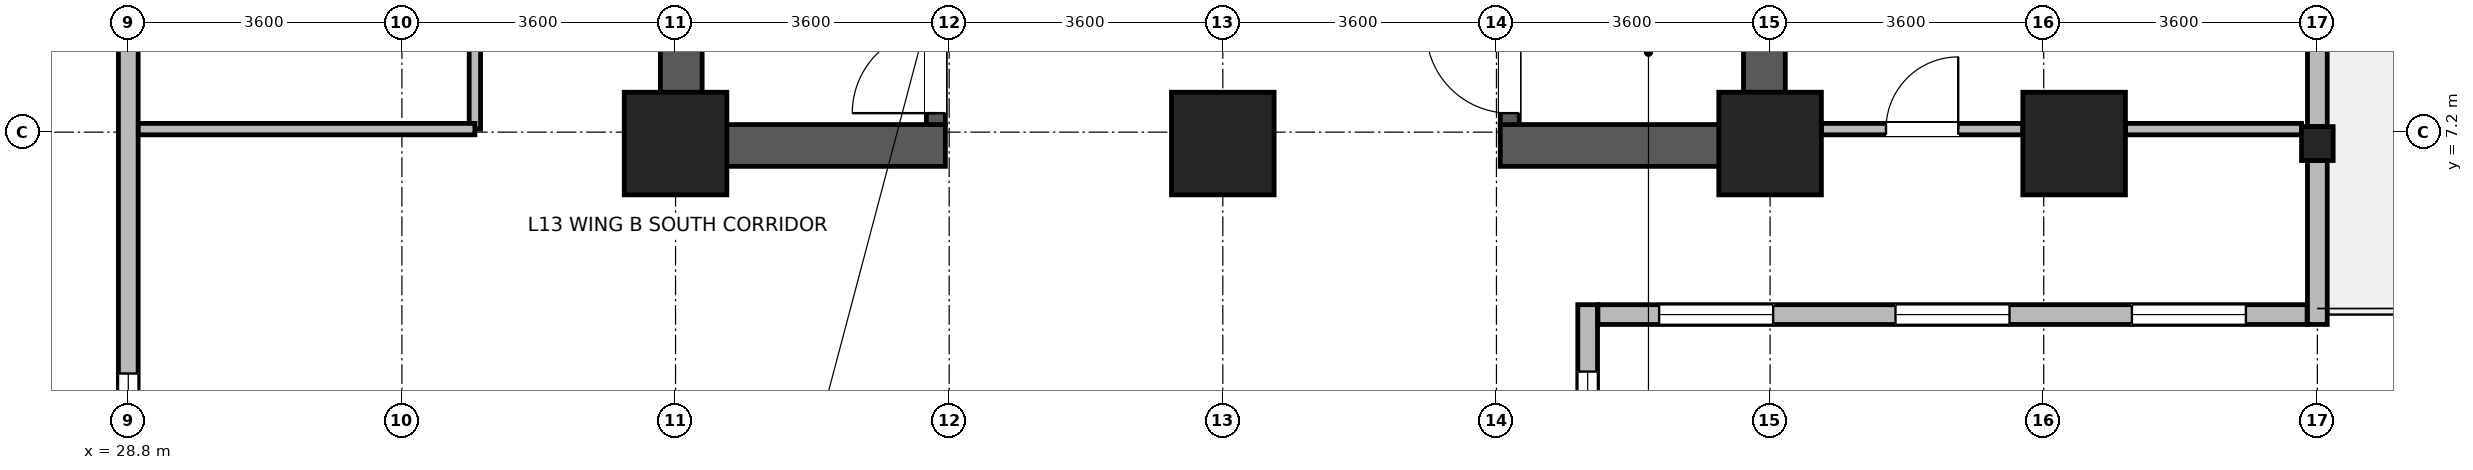
"""IFC4 building model, lengths in metres.
Left out: names, types, materials, properties, quantities, classifications, styles, units other than length and angle.
Written with IfcOpenShell. Run it as: python <this file> out.ifc"""

import sys

from ifc_helpers import new_model, si_unit, direction, frame, frame_2d, origin, origin_2d, place, context, subcontext, project, spatial, rectangle, i_section, extrude, source, transform, mapped, element, fill, save


model = new_model("IFC4")
c1 = context("Model", 3, precision=1e-05, world=origin(), true_north=direction((0.0, 1.0)))
c2 = subcontext(c1, "Body", "Model", "MODEL_VIEW")
j1 = project(units=[si_unit("LENGTHUNIT", "METRE"), si_unit("PLANEANGLEUNIT", "RADIAN")], contexts=[c1])
p1 = place(None, origin())
s1 = spatial("IfcSite", under=j1, at=p1, CompositionType="ELEMENT")
p2 = place(p1, origin())
s2 = spatial("IfcBuilding", under=s1, at=p2, CompositionType="ELEMENT")
p3 = place(p2, frame((0.0, 0.0, 54.9)))
s3 = spatial("IfcBuildingStorey", under=s2, at=p3, CompositionType="ELEMENT", Elevation=54.9)
for number, where, z_axis, x_axis in (
    (1, (36.075, 6.75, 0.0), (0.0, 0.0, 1.0), (0.0, 1.0, 0.0)),
    (2, (50.325, 6.75, 0.0), (0.0, 0.0, 1.0), (0.0, 1.0, 0.0)),
):
    element("IfcWall", number, at=place(p3, frame(where, z_axis=z_axis, x_axis=x_axis)), inside=s3, PredefinedType="SHEAR", context=c2, shape_type="SweptSolid", body=[
        extrude(rectangle(XDim=8.1, YDim=0.55, at=frame_2d((4.05, 0.0))), origin(), (0.0, 0.0, 1.0), 3.45),
    ])
for number, where, z_axis, x_axis in (
    (3, (36.35, 7.025, 0.0), (0.0, 0.0, 1.0), (1.0, 0.0, 0.0)),
    (4, (46.85, 7.025, 0.0), (0.0, 0.0, 1.0), (1.0, 0.0, 0.0)),
):
    element("IfcWall", number, at=place(p3, frame(where, z_axis=z_axis, x_axis=x_axis)), inside=s3, PredefinedType="SHEAR", context=c2, shape_type="SweptSolid", body=[
        extrude(rectangle(XDim=3.2, YDim=0.55, at=frame_2d((1.6, 0.0))), origin(), (0.0, 0.0, 1.0), 3.45),
    ])
p4 = place(p3, frame((39.425, 7.3, 0.0), z_axis=(0.0, 0.0, 1.0), x_axis=(0.0, 1.0, 0.0)))
e5 = element("IfcWall", 5, at=p4, inside=s3, PredefinedType="SHEAR", context=c2, shape_type="SweptSolid", body=[
    extrude(rectangle(XDim=7.0, YDim=0.25, at=frame_2d((3.5, 0.0))), origin(), (0.0, 0.0, 1.0), 3.45),
])
p5 = place(p4, frame((0.15, 0.0, 0.0)))
e6 = element("IfcOpeningElement", 6, at=p5, cuts=e5, PredefinedType="OPENING", context=c2, shape_type="SweptSolid", body=[
    extrude(rectangle(XDim=1.1, YDim=2.08, at=frame_2d((0.55, 1.04))), frame((0.0, 0.135, 0.0), z_axis=(0.0, -1.0, 0.0), x_axis=(1.0, 0.0, 0.0)), (0.0, 0.0, 1.0), 0.27),
])
p6 = place(p3, frame((46.975, 7.3, 0.0), z_axis=(0.0, 0.0, 1.0), x_axis=(0.0, 1.0, 0.0)))
e7 = element("IfcWall", 7, at=p6, inside=s3, PredefinedType="SHEAR", context=c2, shape_type="SweptSolid", body=[
    extrude(rectangle(XDim=7.0, YDim=0.25, at=frame_2d((3.5, 0.0))), origin(), (0.0, 0.0, 1.0), 3.45),
])
p7 = place(p6, frame((0.15, 0.0, 0.0)))
e8 = element("IfcOpeningElement", 8, at=p7, cuts=e7, PredefinedType="OPENING", context=c2, shape_type="SweptSolid", body=[
    extrude(rectangle(XDim=1.1, YDim=2.08, at=frame_2d((0.55, 1.04))), frame((0.0, 0.135, 0.0), z_axis=(0.0, -1.0, 0.0), x_axis=(1.0, 0.0, 0.0)), (0.0, 0.0, 1.0), 0.27),
])
m1 = source(origin(), c2, "Body", "SweptSolid", [
    extrude(rectangle(XDim=1.35, YDim=1.35, at=origin_2d()), origin(), (0.0, 0.0, 1.0), 3.7),
])
for number, where, z_axis, x_axis in (
    (9, (36.0, 7.05, 0.0), (0.0, 0.0, 1.0), (1.0, 0.0, 0.0)),
    (10, (43.2, 7.05, 0.0), (0.0, 0.0, 1.0), (1.0, 0.0, 0.0)),
    (11, (50.4, 7.05, 0.0), (0.0, 0.0, 1.0), (1.0, 0.0, 0.0)),
    (12, (54.4, 7.05, 0.0), (0.0, 0.0, 1.0), (1.0, 0.0, 0.0)),
):
    element("IfcColumn", number, at=place(p3, frame(where, z_axis=z_axis, x_axis=x_axis)), inside=s3, PredefinedType="COLUMN", context=c2, shape_type="MappedRepresentation", body=[
        mapped(m1, transform((0.0, 0.0, 0.0), x_axis=(1.0, 0.0, 0.0), y_axis=(0.0, 1.0, 0.0), z_axis=(0.0, 0.0, 1.0), scale=1.0)),
    ])
m2 = source(origin(), c2, "Body", "SweptSolid", [
    extrude(i_section(OverallWidth=0.416, OverallDepth=0.446, WebThickness=0.029, FlangeThickness=0.04, FilletRadius=0.015, at=origin_2d()), origin(), (0.0, 0.0, 1.0), 3.7),
])
p8 = place(p3, frame((57.6, 7.05, 0.0), z_axis=(0.0, 0.0, 1.0), x_axis=(1.0, 0.0, 0.0)))
e13 = element("IfcColumn", 13, at=p8, inside=s3, PredefinedType="COLUMN", context=c2, shape_type="MappedRepresentation", body=[
    mapped(m2, transform((0.0, 0.0, 0.0), x_axis=(1.0, 0.0, 0.0), y_axis=(0.0, 1.0, 0.0), z_axis=(0.0, 0.0, 1.0), scale=1.0)),
])
p9 = place(p3, frame((48.0, 4.93, 0.0), z_axis=(0.0, 0.0, 1.0), x_axis=(0.0, -1.0, 0.0)))
e14 = element("IfcWall", 14, at=p9, inside=s3, PredefinedType="STANDARD", context=c2, shape_type="SweptSolid", body=[
    extrude(rectangle(XDim=3.26, YDim=0.26, at=frame_2d((1.63, 0.0))), origin(), (0.0, 0.0, 1.0), 3.43),
])
p10 = place(p9, frame((0.88, 0.0, 0.85)))
e15 = element("IfcOpeningElement", 15, at=p10, cuts=e14, PredefinedType="OPENING", context=c2, shape_type="SweptSolid", body=[
    extrude(rectangle(XDim=1.5, YDim=1.85, at=frame_2d((0.75, 0.925))), frame((0.0, 0.14, 0.0), z_axis=(0.0, -1.0, 0.0), x_axis=(1.0, 0.0, 0.0)), (0.0, 0.0, 1.0), 0.28),
])
p11 = place(p3, frame((57.465, 4.8, 0.0), z_axis=(0.0, 0.0, 1.0), x_axis=(-1.0, 0.0, 0.0)))
e16 = element("IfcWall", 16, at=p11, inside=s3, PredefinedType="STANDARD", context=c2, shape_type="SweptSolid", body=[
    extrude(rectangle(XDim=9.33, YDim=0.26, at=frame_2d((4.665, 0.0))), origin(), (0.0, 0.0, 1.0), 3.43),
])
p12 = place(p11, frame((0.805, 0.0, 0.85)))
e17 = element("IfcOpeningElement", 17, at=p12, cuts=e16, PredefinedType="OPENING", context=c2, shape_type="SweptSolid", body=[
    extrude(rectangle(XDim=1.5, YDim=1.85, at=frame_2d((0.75, 0.925))), frame((0.0, 0.14, 0.0), z_axis=(0.0, -1.0, 0.0), x_axis=(1.0, 0.0, 0.0)), (0.0, 0.0, 1.0), 0.28),
])
p13 = place(p11, frame((3.915, 0.0, 0.85)))
e18 = element("IfcOpeningElement", 18, at=p13, cuts=e16, PredefinedType="OPENING", context=c2, shape_type="SweptSolid", body=[
    extrude(rectangle(XDim=1.5, YDim=1.85, at=frame_2d((0.75, 0.925))), frame((0.0, 0.14, 0.0), z_axis=(0.0, -1.0, 0.0), x_axis=(1.0, 0.0, 0.0)), (0.0, 0.0, 1.0), 0.28),
])
p14 = place(p11, frame((7.025, 0.0, 0.85)))
e19 = element("IfcOpeningElement", 19, at=p14, cuts=e16, PredefinedType="OPENING", context=c2, shape_type="SweptSolid", body=[
    extrude(rectangle(XDim=1.5, YDim=1.85, at=frame_2d((0.75, 0.925))), frame((0.0, 0.14, 0.0), z_axis=(0.0, -1.0, 0.0), x_axis=(1.0, 0.0, 0.0)), (0.0, 0.0, 1.0), 0.28),
])
p15 = place(p3, frame((57.6, 6.826, 0.0), z_axis=(0.0, 0.0, 1.0), x_axis=(0.0, -1.0, 0.0)))
e20 = element("IfcWall", 20, at=p15, inside=s3, PredefinedType="STANDARD", context=c2, shape_type="SweptSolid", body=[
    extrude(rectangle(XDim=2.156, YDim=0.26, at=frame_2d((1.078, 0.0))), origin(), (0.0, 0.0, 1.0), 3.43),
])
p16 = place(p3, frame((57.6, 14.326, 0.0), z_axis=(0.0, 0.0, 1.0), x_axis=(0.0, -1.0, 0.0)))
e21 = element("IfcWall", 21, at=p16, inside=s3, PredefinedType="STANDARD", context=c2, shape_type="SweptSolid", body=[
    extrude(rectangle(XDim=7.052, YDim=0.26, at=frame_2d((3.526, 0.0))), origin(), (0.0, 0.0, 1.0), 2.93),
])
p17 = place(p16, frame((2.776, 0.0, 0.0)))
e22 = element("IfcOpeningElement", 22, at=p17, cuts=e21, PredefinedType="OPENING", context=c2, shape_type="SweptSolid", body=[
    extrude(rectangle(XDim=1.5, YDim=2.15, at=frame_2d((0.75, 1.075))), frame((0.0, 0.14, 0.0), z_axis=(0.0, -1.0, 0.0), x_axis=(1.0, 0.0, 0.0)), (0.0, 0.0, 1.0), 0.28),
])
p18 = place(p16, frame((1.013, 0.0, 0.85)))
e23 = element("IfcOpeningElement", 23, at=p18, cuts=e21, PredefinedType="OPENING", context=c2, shape_type="SweptSolid", body=[
    extrude(rectangle(XDim=1.5, YDim=1.85, at=frame_2d((0.75, 0.925))), frame((0.0, 0.14, 0.0), z_axis=(0.0, -1.0, 0.0), x_axis=(1.0, 0.0, 0.0)), (0.0, 0.0, 1.0), 0.28),
])
p19 = place(p16, frame((4.539, 0.0, 0.85)))
e24 = element("IfcOpeningElement", 24, at=p19, cuts=e21, PredefinedType="OPENING", context=c2, shape_type="SweptSolid", body=[
    extrude(rectangle(XDim=1.5, YDim=1.85, at=frame_2d((0.75, 0.925))), frame((0.0, 0.14, 0.0), z_axis=(0.0, -1.0, 0.0), x_axis=(1.0, 0.0, 0.0)), (0.0, 0.0, 1.0), 0.28),
])
p20 = place(p3, frame((28.8, 1.67, 0.0), z_axis=(0.0, 0.0, 1.0), x_axis=(0.0, 1.0, 0.0)))
e25 = element("IfcWall", 25, at=p20, inside=s3, PredefinedType="STANDARD", context=c2, shape_type="SweptSolid", body=[
    extrude(rectangle(XDim=19.254, YDim=0.26, at=frame_2d((9.627, 0.0))), origin(), (0.0, 0.0, 1.0), 3.43),
])
p21 = place(p20, frame((0.854, 0.0, 0.85)))
e26 = element("IfcOpeningElement", 26, at=p21, cuts=e25, PredefinedType="OPENING", context=c2, shape_type="SweptSolid", body=[
    extrude(rectangle(XDim=1.5, YDim=1.85, at=frame_2d((0.75, 0.925))), frame((0.0, 0.14, 0.0), z_axis=(0.0, -1.0, 0.0), x_axis=(1.0, 0.0, 0.0)), (0.0, 0.0, 1.0), 0.28),
])
p22 = place(p20, frame((7.272, 0.0, 0.85)))
e27 = element("IfcOpeningElement", 27, at=p22, cuts=e25, PredefinedType="OPENING", context=c2, shape_type="SweptSolid", body=[
    extrude(rectangle(XDim=1.5, YDim=1.85, at=frame_2d((0.75, 0.925))), frame((0.0, 0.14, 0.0), z_axis=(0.0, -1.0, 0.0), x_axis=(1.0, 0.0, 0.0)), (0.0, 0.0, 1.0), 0.28),
])
p23 = place(p20, frame((10.481, 0.0, 0.85)))
e28 = element("IfcOpeningElement", 28, at=p23, cuts=e25, PredefinedType="OPENING", context=c2, shape_type="SweptSolid", body=[
    extrude(rectangle(XDim=1.5, YDim=1.85, at=frame_2d((0.75, 0.925))), frame((0.0, 0.14, 0.0), z_axis=(0.0, -1.0, 0.0), x_axis=(1.0, 0.0, 0.0)), (0.0, 0.0, 1.0), 0.28),
])
p24 = place(p20, frame((13.69, 0.0, 0.85)))
e29 = element("IfcOpeningElement", 29, at=p24, cuts=e25, PredefinedType="OPENING", context=c2, shape_type="SweptSolid", body=[
    extrude(rectangle(XDim=1.5, YDim=1.85, at=frame_2d((0.75, 0.925))), frame((0.0, 0.14, 0.0), z_axis=(0.0, -1.0, 0.0), x_axis=(1.0, 0.0, 0.0)), (0.0, 0.0, 1.0), 0.28),
])
p25 = place(p20, frame((16.899, 0.0, 0.85)))
e30 = element("IfcOpeningElement", 30, at=p25, cuts=e25, PredefinedType="OPENING", context=c2, shape_type="SweptSolid", body=[
    extrude(rectangle(XDim=1.5, YDim=1.85, at=frame_2d((0.75, 0.925))), frame((0.0, 0.14, 0.0), z_axis=(0.0, -1.0, 0.0), x_axis=(1.0, 0.0, 0.0)), (0.0, 0.0, 1.0), 0.28),
])
p26 = place(p3, frame((33.36, 7.24, 0.0), z_axis=(0.0, 0.0, 1.0), x_axis=(0.0, 1.0, 0.0)))
e31 = element("IfcWall", 31, at=p26, inside=s3, PredefinedType="PARTITIONING", context=c2, shape_type="SweptSolid", body=[
    extrude(rectangle(XDim=7.26, YDim=0.15, at=frame_2d((3.63, 0.0))), origin(), (0.0, 0.0, 1.0), 3.43),
])
p27 = place(p26, frame((2.98, 0.0, 0.0)))
e32 = element("IfcOpeningElement", 32, at=p27, cuts=e31, PredefinedType="OPENING", context=c2, shape_type="SweptSolid", body=[
    extrude(rectangle(XDim=1.3, YDim=2.12, at=frame_2d((0.65, 1.06))), frame((0.0, 0.085, 0.0), z_axis=(0.0, -1.0, 0.0), x_axis=(1.0, 0.0, 0.0)), (0.0, 0.0, 1.0), 0.17),
])
p28 = place(p3, frame((51.075, 7.24, 0.0), z_axis=(0.0, 0.0, 1.0), x_axis=(1.0, 0.0, 0.0)))
e33 = element("IfcWall", 33, at=p28, inside=s3, PredefinedType="PARTITIONING", context=c2, shape_type="SweptSolid", body=[
    extrude(rectangle(XDim=2.65, YDim=0.15, at=frame_2d((1.325, 0.0))), origin(), (0.0, 0.0, 1.0), 2.78),
])
p29 = place(p28, frame((0.85, 0.0, 0.0)))
e34 = element("IfcOpeningElement", 34, at=p29, cuts=e33, PredefinedType="OPENING", context=c2, shape_type="SweptSolid", body=[
    extrude(rectangle(XDim=0.95, YDim=2.1, at=frame_2d((0.475, 1.05))), frame((0.0, 0.085, 0.0), z_axis=(0.0, -1.0, 0.0), x_axis=(1.0, 0.0, 0.0)), (0.0, 0.0, 1.0), 0.17),
])
p30 = place(p3, frame((55.075, 7.24, 0.0), z_axis=(0.0, 0.0, 1.0), x_axis=(1.0, 0.0, 0.0)))
e35 = element("IfcWall", 35, at=p30, inside=s3, PredefinedType="PARTITIONING", context=c2, shape_type="SweptSolid", body=[
    extrude(rectangle(XDim=2.317, YDim=0.15, at=frame_2d((1.159, 0.0))), origin(), (0.0, 0.0, 1.0), 2.78),
])
p31 = place(p3, frame((28.932, 7.24, 0.0), z_axis=(0.0, 0.0, 1.0), x_axis=(1.0, 0.0, 0.0)))
e36 = element("IfcWall", 36, at=p31, inside=s3, PredefinedType="PARTITIONING", context=c2, shape_type="SweptSolid", body=[
    extrude(rectangle(XDim=4.428, YDim=0.15, at=frame_2d((2.214, 0.0))), origin(), (0.0, 0.0, 1.0), 3.43),
])
p32 = place(p10, origin())
e37 = element("IfcWindow", 37, at=p32, inside=s3, PartitioningType="SINGLE_PANEL", PredefinedType="WINDOW", context=c2, shape_type="SweptSolid", body=[
    extrude(rectangle(XDim=1.5, YDim=1.85, at=frame_2d((0.75, 0.925))), frame((0.0, 0.03, 0.0), z_axis=(0.0, -1.0, 0.0), x_axis=(1.0, 0.0, 0.0)), (0.0, 0.0, 1.0), 0.06),
])
fill(e15, e37)
p33 = place(p12, origin())
e38 = element("IfcWindow", 38, at=p33, inside=s3, PartitioningType="SINGLE_PANEL", PredefinedType="WINDOW", context=c2, shape_type="SweptSolid", body=[
    extrude(rectangle(XDim=1.5, YDim=1.85, at=frame_2d((0.75, 0.925))), frame((0.0, 0.03, 0.0), z_axis=(0.0, -1.0, 0.0), x_axis=(1.0, 0.0, 0.0)), (0.0, 0.0, 1.0), 0.06),
])
fill(e17, e38)
p34 = place(p13, origin())
e39 = element("IfcWindow", 39, at=p34, inside=s3, PartitioningType="SINGLE_PANEL", PredefinedType="WINDOW", context=c2, shape_type="SweptSolid", body=[
    extrude(rectangle(XDim=1.5, YDim=1.85, at=frame_2d((0.75, 0.925))), frame((0.0, 0.03, 0.0), z_axis=(0.0, -1.0, 0.0), x_axis=(1.0, 0.0, 0.0)), (0.0, 0.0, 1.0), 0.06),
])
fill(e18, e39)
p35 = place(p14, origin())
e40 = element("IfcWindow", 40, at=p35, inside=s3, PartitioningType="SINGLE_PANEL", PredefinedType="WINDOW", context=c2, shape_type="SweptSolid", body=[
    extrude(rectangle(XDim=1.5, YDim=1.85, at=frame_2d((0.75, 0.925))), frame((0.0, 0.03, 0.0), z_axis=(0.0, -1.0, 0.0), x_axis=(1.0, 0.0, 0.0)), (0.0, 0.0, 1.0), 0.06),
])
fill(e19, e40)
p36 = place(p21, origin())
e41 = element("IfcWindow", 41, at=p36, inside=s3, PartitioningType="SINGLE_PANEL", PredefinedType="WINDOW", context=c2, shape_type="SweptSolid", body=[
    extrude(rectangle(XDim=1.5, YDim=1.85, at=frame_2d((0.75, 0.925))), frame((0.0, 0.03, 0.0), z_axis=(0.0, -1.0, 0.0), x_axis=(1.0, 0.0, 0.0)), (0.0, 0.0, 1.0), 0.06),
])
fill(e26, e41)
p37 = place(p5, origin())
e42 = element("IfcDoor", 42, at=p37, inside=s3, OperationType="SINGLE_SWING_LEFT", PredefinedType="DOOR", context=c2, shape_type="SweptSolid", body=[
    extrude(rectangle(XDim=1.1, YDim=2.08, at=frame_2d((0.55, 1.04))), frame((0.0, 0.025, 0.0), z_axis=(0.0, -1.0, 0.0), x_axis=(1.0, 0.0, 0.0)), (0.0, 0.0, 1.0), 0.05),
])
fill(e6, e42)
p38 = place(p7, origin())
e43 = element("IfcDoor", 43, at=p38, inside=s3, OperationType="SINGLE_SWING_RIGHT", PredefinedType="DOOR", context=c2, shape_type="SweptSolid", body=[
    extrude(rectangle(XDim=1.1, YDim=2.08, at=frame_2d((0.55, 1.04))), frame((0.0, 0.025, 0.0), z_axis=(0.0, -1.0, 0.0), x_axis=(1.0, 0.0, 0.0)), (0.0, 0.0, 1.0), 0.05),
])
fill(e8, e43)
p39 = place(p29, origin())
e44 = element("IfcDoor", 44, at=p39, inside=s3, OperationType="SINGLE_SWING_RIGHT", PredefinedType="DOOR", context=c2, shape_type="SweptSolid", body=[
    extrude(rectangle(XDim=0.95, YDim=2.1, at=frame_2d((0.475, 1.05))), frame((0.0, 0.025, 0.0), z_axis=(0.0, -1.0, 0.0), x_axis=(1.0, 0.0, 0.0)), (0.0, 0.0, 1.0), 0.05),
])
fill(e34, e44)
save(model, sys.argv[1])
